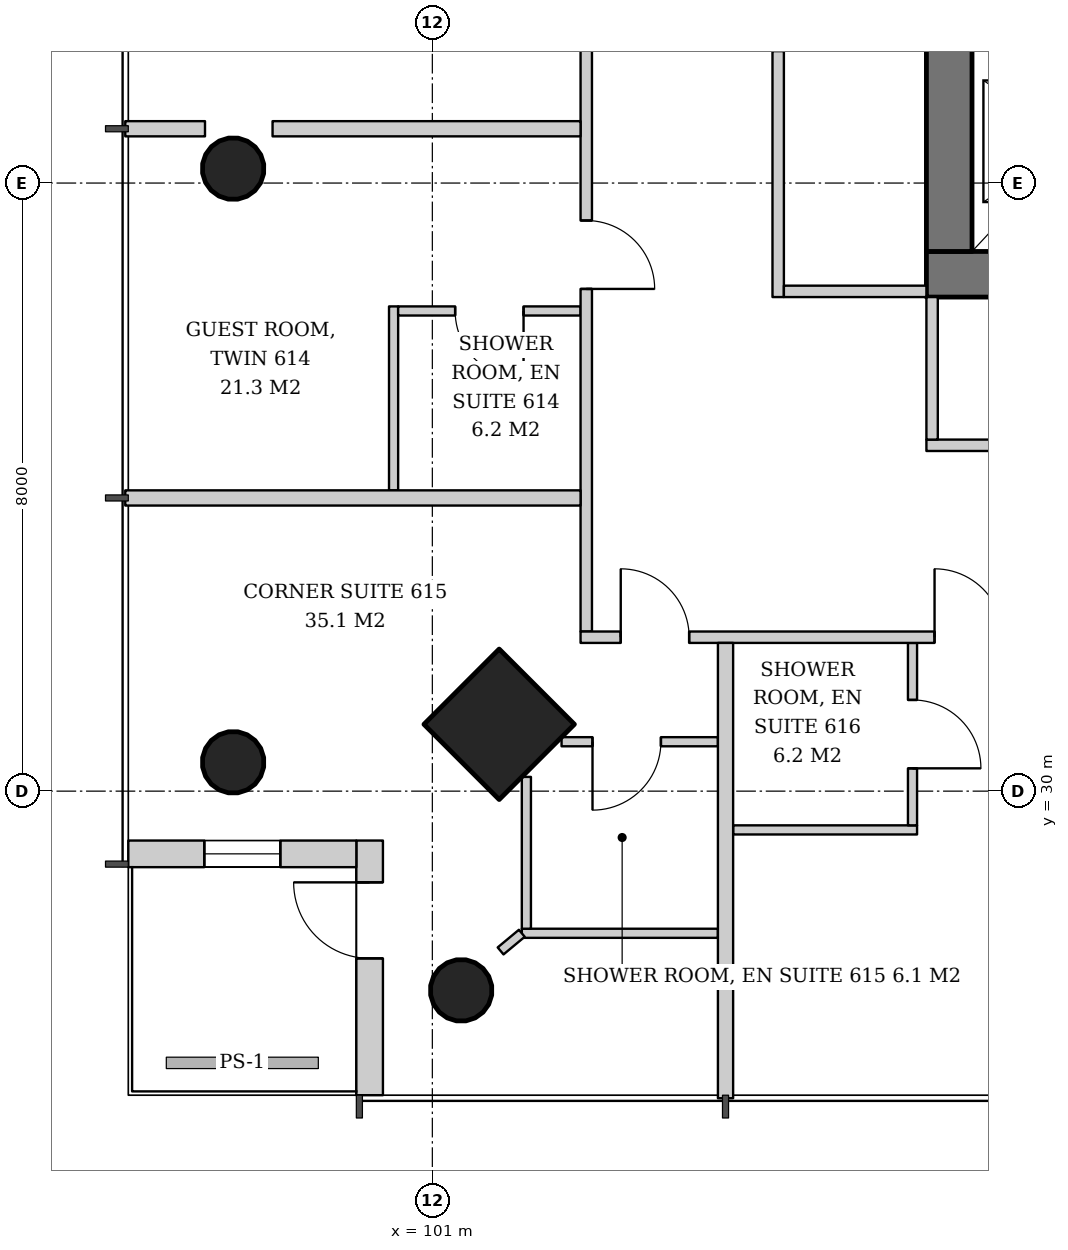
"""IFC4 building model, lengths in metres.
Left out: names, types, materials, properties, quantities, classifications, styles, units other than length and angle.
Written with IfcOpenShell. Run it as: python <this file> out.ifc"""

import sys

from ifc_helpers import new_model, si_unit, direction, frame, frame_2d, origin, origin_2d, place, context, subcontext, project, spatial, rectangle, hollow_circle, extrude, element, fill, save


model = new_model("IFC4")
c1 = context("Model", 3, precision=1e-05, world=origin(), true_north=direction((0.0, 1.0)))
c2 = subcontext(c1, "Body", "Model", "MODEL_VIEW")
j1 = project(units=[si_unit("LENGTHUNIT", "METRE"), si_unit("PLANEANGLEUNIT", "RADIAN")], contexts=[c1])
p1 = place(None, origin())
s1 = spatial("IfcSite", under=j1, at=p1, CompositionType="ELEMENT")
p2 = place(p1, origin())
s2 = spatial("IfcBuilding", under=s1, at=p2, CompositionType="ELEMENT")
p3 = place(p2, frame((0.0, 0.0, 28.6)))
s3 = spatial("IfcBuildingStorey", under=s2, at=p3, CompositionType="ELEMENT", Elevation=28.6)
p4 = place(p3, frame((101.828, 30.828, 0.0), z_axis=(0.043032401563, 0.043032401563, 0.998146494675), x_axis=(-0.707106781187, 0.707106781187, 0.0)))
e1 = element("IfcColumn", 1, at=p4, inside=s3, PredefinedType="COLUMN", context=c2, shape_type="SweptSolid", body=[
    extrude(rectangle(XDim=1.4, YDim=1.4, at=origin_2d()), origin(), (0.0, 0.0, 1.0), 3.807),
])
p5 = place(p3, frame((98.328, 30.328, 0.0), z_axis=(0.043032401563, 0.043032401563, 0.998146494675), x_axis=(-0.707106781187, 0.707106781187, 0.0)))
e2 = element("IfcColumn", 2, at=p5, inside=s3, PredefinedType="COLUMN", context=c2, shape_type="SweptSolid", body=[
    extrude(hollow_circle(Radius=0.406, WallThickness=0.03, at=origin_2d()), origin(), (0.0, 0.0, 1.0), 3.807),
])
p6 = place(p3, frame((98.328, 38.164, 0.0), z_axis=(0.04306234503, 0.02149908433, 0.998841040313), x_axis=(-0.446680166538, 0.894693706707, 0.0)))
e3 = element("IfcColumn", 3, at=p6, inside=s3, PredefinedType="COLUMN", context=c2, shape_type="SweptSolid", body=[
    extrude(hollow_circle(Radius=0.406, WallThickness=0.03, at=origin_2d()), origin(), (0.0, 0.0, 1.0), 3.804),
])
p7 = place(p3, frame((101.328, 27.328, 0.0), z_axis=(0.043032401563, 0.043032401563, 0.998146494675), x_axis=(-0.707106781187, 0.707106781187, 0.0)))
e4 = element("IfcColumn", 4, at=p7, inside=s3, PredefinedType="COLUMN", context=c2, shape_type="SweptSolid", body=[
    extrude(hollow_circle(Radius=0.406, WallThickness=0.03, at=origin_2d()), origin(), (0.0, 0.0, 1.0), 3.807),
])
p8 = place(p3, frame((107.5, 36.8, 0.0), z_axis=(0.0, 0.0, 1.0), x_axis=(1.0, 0.0, 0.0)))
e5 = element("IfcWall", 5, at=p8, inside=s3, PredefinedType="SHEAR", context=c2, shape_type="SweptSolid", body=[
    extrude(rectangle(XDim=19.0, YDim=0.6, at=frame_2d((9.5, 0.0))), origin(), (0.0, 0.0, 1.0), 3.8),
])
p9 = place(p8, frame((3.9, 0.0, 0.0)))
e6 = element("IfcOpeningElement", 6, at=p9, cuts=e5, PredefinedType="OPENING", context=c2, shape_type="SweptSolid", body=[
    extrude(rectangle(XDim=1.0, YDim=2.1, at=frame_2d((0.5, 1.05))), frame((0.0, 0.31, 0.0), z_axis=(0.0, -1.0, 0.0), x_axis=(1.0, 0.0, 0.0)), (0.0, 0.0, 1.0), 0.62),
])
p10 = place(p8, frame((14.472, 0.0, 0.0)))
e7 = element("IfcOpeningElement", 7, at=p10, cuts=e5, PredefinedType="OPENING", context=c2, shape_type="SweptSolid", body=[
    extrude(rectangle(XDim=1.0, YDim=2.1, at=frame_2d((0.5, 1.05))), frame((0.0, 0.31, 0.0), z_axis=(0.0, -1.0, 0.0), x_axis=(1.0, 0.0, 0.0)), (0.0, 0.0, 1.0), 0.62),
])
p11 = place(p8, frame((16.365, 0.0, 0.0)))
e8 = element("IfcOpeningElement", 8, at=p11, cuts=e5, PredefinedType="OPENING", context=c2, shape_type="SweptSolid", body=[
    extrude(rectangle(XDim=1.0, YDim=2.1, at=frame_2d((0.5, 1.05))), frame((0.0, 0.31, 0.0), z_axis=(0.0, -1.0, 0.0), x_axis=(1.0, 0.0, 0.0)), (0.0, 0.0, 1.0), 0.62),
])
p12 = place(p3, frame((107.8, 37.1, 0.0), z_axis=(0.0, 0.0, 1.0), x_axis=(0.0, 1.0, 0.0)))
e9 = element("IfcWall", 9, at=p12, inside=s3, PredefinedType="SHEAR", context=c2, shape_type="SweptSolid", body=[
    extrude(rectangle(XDim=17.8, YDim=0.6, at=frame_2d((8.9, 0.0))), origin(), (0.0, 0.0, 1.0), 3.8),
])
p13 = place(p12, frame((8.0, 0.0, 0.0)))
e10 = element("IfcOpeningElement", 10, at=p13, cuts=e9, PredefinedType="OPENING", context=c2, shape_type="SweptSolid", body=[
    extrude(rectangle(XDim=1.8, YDim=2.4, at=frame_2d((0.9, 1.2))), frame((0.0, 0.31, 0.0), z_axis=(0.0, -1.0, 0.0), x_axis=(1.0, 0.0, 0.0)), (0.0, 0.0, 1.0), 0.62),
])
p14 = place(p3, frame((100.175, 26.0, 0.0), z_axis=(0.0, 0.0, 1.0), x_axis=(0.0, 1.0, 0.0)))
e11 = element("IfcWall", 11, at=p14, inside=s3, PredefinedType="SOLIDWALL", context=c2, shape_type="SweptSolid", body=[
    extrude(rectangle(XDim=3.35, YDim=0.35, at=frame_2d((1.675, 0.0))), origin(), (0.0, 0.0, 1.0), 3.6),
])
p15 = place(p14, frame((1.8, 0.0, 0.0)))
e12 = element("IfcOpeningElement", 12, at=p15, cuts=e11, PredefinedType="OPENING", context=c2, shape_type="SweptSolid", body=[
    extrude(rectangle(XDim=1.0, YDim=2.4, at=frame_2d((0.5, 1.2))), frame((0.0, 0.185, 0.0), z_axis=(0.0, -1.0, 0.0), x_axis=(1.0, 0.0, 0.0)), (0.0, 0.0, 1.0), 0.37),
])
p16 = place(p3, frame((100.0, 29.175, 0.0), z_axis=(0.0, 0.0, 1.0), x_axis=(-1.0, 0.0, 0.0)))
e13 = element("IfcWall", 13, at=p16, inside=s3, PredefinedType="SOLIDWALL", context=c2, shape_type="SweptSolid", body=[
    extrude(rectangle(XDim=3.0, YDim=0.35, at=frame_2d((1.5, 0.0))), origin(), (0.0, 0.0, 1.0), 3.6),
])
p17 = place(p16, frame((1.0, 0.0, 0.9)))
e14 = element("IfcOpeningElement", 14, at=p17, cuts=e13, PredefinedType="OPENING", context=c2, shape_type="SweptSolid", body=[
    extrude(rectangle(XDim=1.0, YDim=2.4, at=frame_2d((0.5, 1.2))), frame((0.0, 0.185, 0.0), z_axis=(0.0, -1.0, 0.0), x_axis=(1.0, 0.0, 0.0)), (0.0, 0.0, 1.0), 0.37),
])
p18 = place(p3, frame((105.55, 43.975, 0.0), z_axis=(0.0, 0.0, 1.0), x_axis=(0.0, -1.0, 0.0)))
e15 = element("IfcWall", 15, at=p18, inside=s3, PredefinedType="PARTITIONING", context=c2, shape_type="SweptSolid", body=[
    extrude(rectangle(XDim=7.475, YDim=0.15, at=frame_2d((3.738, 0.0))), origin(), (0.0, 0.0, 1.0), 2.847),
])
p19 = place(p18, frame((3.238, 0.0, 0.0)))
e16 = element("IfcOpeningElement", 16, at=p19, cuts=e15, PredefinedType="OPENING", context=c2, shape_type="SweptSolid", body=[
    extrude(rectangle(XDim=1.0, YDim=2.1, at=frame_2d((0.5, 1.05))), frame((0.0, 0.085, 0.0), z_axis=(0.0, -1.0, 0.0), x_axis=(1.0, 0.0, 0.0)), (0.0, 0.0, 1.0), 0.17),
])
p20 = place(p3, frame((107.5, 36.575, 0.0), z_axis=(0.0, 0.0, 1.0), x_axis=(-1.0, 0.0, 0.0)))
e17 = element("IfcWall", 17, at=p20, inside=s3, PredefinedType="PARTITIONING", context=c2, shape_type="SweptSolid", body=[
    extrude(rectangle(XDim=1.875, YDim=0.15, at=frame_2d((0.938, 0.0))), origin(), (0.0, 0.0, 1.0), 3.6),
])
p21 = place(p3, frame((107.5, 34.55, 0.0), z_axis=(0.0, 0.0, 1.0), x_axis=(1.0, 0.0, 0.0)))
e18 = element("IfcWall", 18, at=p21, inside=s3, PredefinedType="PARTITIONING", context=c2, shape_type="SweptSolid", body=[
    extrude(rectangle(XDim=2.775, YDim=0.15, at=frame_2d((1.387, 0.0))), origin(), (0.0, 0.0, 1.0), 2.8),
])
p22 = place(p21, frame((0.887, 0.0, 0.0)))
e19 = element("IfcOpeningElement", 19, at=p22, cuts=e18, PredefinedType="OPENING", context=c2, shape_type="SweptSolid", body=[
    extrude(rectangle(XDim=1.0, YDim=2.1, at=frame_2d((0.5, 1.05))), frame((0.0, 0.085, 0.0), z_axis=(0.0, -1.0, 0.0), x_axis=(1.0, 0.0, 0.0)), (0.0, 0.0, 1.0), 0.17),
])
p23 = place(p3, frame((107.575, 36.5, 0.0), z_axis=(0.0, 0.0, 1.0), x_axis=(0.0, -1.0, 0.0)))
e20 = element("IfcWall", 20, at=p23, inside=s3, PredefinedType="PARTITIONING", context=c2, shape_type="SweptSolid", body=[
    extrude(rectangle(XDim=1.875, YDim=0.15, at=frame_2d((0.938, 0.0))), origin(), (0.0, 0.0, 1.0), 2.8),
])
p24 = place(p3, frame((100.49, 36.377, 0.0), z_axis=(0.0, 0.0, 1.0), x_axis=(0.0, -1.0, 0.0)))
e21 = element("IfcWall", 21, at=p24, inside=s3, PredefinedType="PARTITIONING", context=c2, shape_type="SweptSolid", body=[
    extrude(rectangle(XDim=2.42, YDim=0.12, at=frame_2d((1.21, 0.0))), origin(), (0.0, 0.0, 1.0), 2.847),
])
p25 = place(p3, frame((102.95, 36.317, 0.0), z_axis=(0.0, 0.0, 1.0), x_axis=(-1.0, 0.0, 0.0)))
e22 = element("IfcWall", 22, at=p25, inside=s3, PredefinedType="PARTITIONING", context=c2, shape_type="SweptSolid", body=[
    extrude(rectangle(XDim=2.4, YDim=0.12, at=frame_2d((1.2, 0.0))), origin(), (0.0, 0.0, 1.0), 3.6),
])
p26 = place(p25, frame((0.75, 0.0, 0.0)))
e23 = element("IfcOpeningElement", 23, at=p26, cuts=e22, PredefinedType="OPENING", context=c2, shape_type="SweptSolid", body=[
    extrude(rectangle(XDim=0.9, YDim=2.1, at=frame_2d((0.45, 1.05))), frame((0.0, 0.07, 0.0), z_axis=(0.0, -1.0, 0.0), x_axis=(1.0, 0.0, 0.0)), (0.0, 0.0, 1.0), 0.14),
])
p27 = place(p3, frame((103.025, 60.05, 0.0), z_axis=(0.0, 0.0, 1.0), x_axis=(0.0, -1.0, 0.0)))
e24 = element("IfcWall", 24, at=p27, inside=s3, PredefinedType="PARTITIONING", context=c2, shape_type="SweptSolid", body=[
    extrude(rectangle(XDim=27.95, YDim=0.15, at=frame_2d((13.975, 0.0))), origin(), (0.0, 0.0, 1.0), 2.8),
])
p28 = place(p27, frame((0.529, 0.0, 0.0)))
e25 = element("IfcOpeningElement", 25, at=p28, cuts=e24, PredefinedType="OPENING", context=c2, shape_type="SweptSolid", body=[
    extrude(rectangle(XDim=0.9, YDim=2.1, at=frame_2d((0.45, 1.05))), frame((0.0, 0.085, 0.0), z_axis=(0.0, -1.0, 0.0), x_axis=(1.0, 0.0, 0.0)), (0.0, 0.0, 1.0), 0.17),
])
p29 = place(p27, frame((4.657, 0.0, 0.0)))
e26 = element("IfcOpeningElement", 26, at=p29, cuts=e24, PredefinedType="OPENING", context=c2, shape_type="SweptSolid", body=[
    extrude(rectangle(XDim=0.9, YDim=2.1, at=frame_2d((0.45, 1.05))), frame((0.0, 0.085, 0.0), z_axis=(0.0, -1.0, 0.0), x_axis=(1.0, 0.0, 0.0)), (0.0, 0.0, 1.0), 0.17),
])
p30 = place(p27, frame((14.322, 0.0, 0.0)))
e27 = element("IfcOpeningElement", 27, at=p30, cuts=e24, PredefinedType="OPENING", context=c2, shape_type="SweptSolid", body=[
    extrude(rectangle(XDim=1.0, YDim=2.1, at=frame_2d((0.5, 1.05))), frame((0.0, 0.085, 0.0), z_axis=(0.0, -1.0, 0.0), x_axis=(1.0, 0.0, 0.0)), (0.0, 0.0, 1.0), 0.17),
])
p31 = place(p27, frame((19.229, 0.0, 0.0)))
e28 = element("IfcOpeningElement", 28, at=p31, cuts=e24, PredefinedType="OPENING", context=c2, shape_type="SweptSolid", body=[
    extrude(rectangle(XDim=0.9, YDim=2.1, at=frame_2d((0.45, 1.05))), frame((0.0, 0.085, 0.0), z_axis=(0.0, -1.0, 0.0), x_axis=(1.0, 0.0, 0.0)), (0.0, 0.0, 1.0), 0.17),
])
p32 = place(p27, frame((22.543, 0.0, 0.0)))
e29 = element("IfcOpeningElement", 29, at=p32, cuts=e24, PredefinedType="OPENING", context=c2, shape_type="SweptSolid", body=[
    extrude(rectangle(XDim=0.9, YDim=2.1, at=frame_2d((0.45, 1.05))), frame((0.0, 0.085, 0.0), z_axis=(0.0, -1.0, 0.0), x_axis=(1.0, 0.0, 0.0)), (0.0, 0.0, 1.0), 0.17),
])
p33 = place(p3, frame((102.95, 38.714, 0.0), z_axis=(0.0, 0.0, 1.0), x_axis=(-1.0, 0.0, 0.0)))
e30 = element("IfcWall", 30, at=p33, inside=s3, PredefinedType="PARTITIONING", context=c2, shape_type="SweptSolid", body=[
    extrude(rectangle(XDim=4.052, YDim=0.2, at=frame_2d((2.026, 0.0))), origin(), (0.0, 0.0, 1.0), 3.6),
])
p34 = place(p3, frame((98.009, 38.714, 0.0), z_axis=(0.0, 0.0, 1.0), x_axis=(-1.0, 0.0, 0.0)))
e31 = element("IfcWall", 31, at=p34, inside=s3, PredefinedType="PARTITIONING", context=c2, shape_type="SweptSolid", body=[
    extrude(rectangle(XDim=1.049, YDim=0.2, at=frame_2d((0.524, 0.0))), origin(), (0.0, 0.0, 1.0), 3.6),
])
p35 = place(p3, frame((102.95, 33.857, 0.0), z_axis=(0.0, 0.0, 1.0), x_axis=(-1.0, 0.0, 0.0)))
e32 = element("IfcWall", 32, at=p35, inside=s3, PredefinedType="PARTITIONING", context=c2, shape_type="SweptSolid", body=[
    extrude(rectangle(XDim=5.99, YDim=0.2, at=frame_2d((2.995, 0.0))), origin(), (0.0, 0.0, 1.0), 3.05),
])
p36 = place(p3, frame((104.757, 30.65, 0.0), z_axis=(0.0, 0.0, 1.0), x_axis=(-1.0, 0.0, 0.0)))
e33 = element("IfcWall", 33, at=p36, inside=s3, PredefinedType="PARTITIONING", context=c2, shape_type="SweptSolid", body=[
    extrude(rectangle(XDim=2.057, YDim=0.12, at=frame_2d((1.029, 0.0))), origin(), (0.0, 0.0, 1.0), 3.6),
])
p37 = place(p36, frame((0.75, 0.0, 0.0)))
e34 = element("IfcOpeningElement", 34, at=p37, cuts=e33, PredefinedType="OPENING", context=c2, shape_type="SweptSolid", body=[
    extrude(rectangle(XDim=0.9, YDim=2.1, at=frame_2d((0.45, 1.05))), frame((0.0, 0.07, 0.0), z_axis=(0.0, -1.0, 0.0), x_axis=(1.0, 0.0, 0.0)), (0.0, 0.0, 1.0), 0.14),
])
p38 = place(p3, frame((104.757, 28.13, 0.0), z_axis=(0.0, 0.0, 1.0), x_axis=(-1.0, 0.0, 0.0)))
e35 = element("IfcWall", 35, at=p38, inside=s3, PredefinedType="PARTITIONING", context=c2, shape_type="SweptSolid", body=[
    extrude(rectangle(XDim=2.58, YDim=0.12, at=frame_2d((1.29, 0.0))), origin(), (0.0, 0.0, 1.0), 3.6),
])
p39 = place(p3, frame((102.237, 30.187, 0.0), z_axis=(0.0, 0.0, 1.0), x_axis=(0.0, -1.0, 0.0)))
e36 = element("IfcWall", 36, at=p39, inside=s3, PredefinedType="PARTITIONING", context=c2, shape_type="SweptSolid", body=[
    extrude(rectangle(XDim=1.997, YDim=0.12, at=frame_2d((0.999, 0.0))), origin(), (0.0, 0.0, 1.0), 3.6),
])
p40 = place(p3, frame((104.957, 29.49, 0.0), z_axis=(0.0, 0.0, 1.0), x_axis=(1.0, 0.0, 0.0)))
e37 = element("IfcWall", 37, at=p40, inside=s3, PredefinedType="PARTITIONING", context=c2, shape_type="SweptSolid", body=[
    extrude(rectangle(XDim=2.42, YDim=0.12, at=frame_2d((1.21, 0.0))), origin(), (0.0, 0.0, 1.0), 3.6),
])
p41 = place(p3, frame((107.317, 31.95, 0.0), z_axis=(0.0, 0.0, 1.0), x_axis=(0.0, -1.0, 0.0)))
e38 = element("IfcWall", 38, at=p41, inside=s3, PredefinedType="PARTITIONING", context=c2, shape_type="SweptSolid", body=[
    extrude(rectangle(XDim=2.4, YDim=0.12, at=frame_2d((1.2, 0.0))), origin(), (0.0, 0.0, 1.0), 2.847),
])
p42 = place(p41, frame((0.75, 0.0, 0.0)))
e39 = element("IfcOpeningElement", 39, at=p42, cuts=e38, PredefinedType="OPENING", context=c2, shape_type="SweptSolid", body=[
    extrude(rectangle(XDim=0.9, YDim=2.1, at=frame_2d((0.45, 1.05))), frame((0.0, 0.07, 0.0), z_axis=(0.0, -1.0, 0.0), x_axis=(1.0, 0.0, 0.0)), (0.0, 0.0, 1.0), 0.14),
])
p43 = place(p3, frame((102.95, 32.025, 0.0), z_axis=(0.0, 0.0, 1.0), x_axis=(1.0, 0.0, 0.0)))
e40 = element("IfcWall", 40, at=p43, inside=s3, PredefinedType="PARTITIONING", context=c2, shape_type="SweptSolid", body=[
    extrude(rectangle(XDim=27.95, YDim=0.15, at=frame_2d((13.975, 0.0))), origin(), (0.0, 0.0, 1.0), 2.8),
])
p44 = place(p43, frame((0.529, 0.0, 0.0)))
e41 = element("IfcOpeningElement", 41, at=p44, cuts=e40, PredefinedType="OPENING", context=c2, shape_type="SweptSolid", body=[
    extrude(rectangle(XDim=0.9, YDim=2.1, at=frame_2d((0.45, 1.05))), frame((0.0, 0.085, 0.0), z_axis=(0.0, -1.0, 0.0), x_axis=(1.0, 0.0, 0.0)), (0.0, 0.0, 1.0), 0.17),
])
p45 = place(p43, frame((4.657, 0.0, 0.0)))
e42 = element("IfcOpeningElement", 42, at=p45, cuts=e40, PredefinedType="OPENING", context=c2, shape_type="SweptSolid", body=[
    extrude(rectangle(XDim=0.9, YDim=2.1, at=frame_2d((0.45, 1.05))), frame((0.0, 0.085, 0.0), z_axis=(0.0, -1.0, 0.0), x_axis=(1.0, 0.0, 0.0)), (0.0, 0.0, 1.0), 0.17),
])
p46 = place(p43, frame((14.371, 0.0, 0.0)))
e43 = element("IfcOpeningElement", 43, at=p46, cuts=e40, PredefinedType="OPENING", context=c2, shape_type="SweptSolid", body=[
    extrude(rectangle(XDim=0.9, YDim=2.1, at=frame_2d((0.45, 1.05))), frame((0.0, 0.085, 0.0), z_axis=(0.0, -1.0, 0.0), x_axis=(1.0, 0.0, 0.0)), (0.0, 0.0, 1.0), 0.17),
])
p47 = place(p43, frame((17.686, 0.0, 0.0)))
e44 = element("IfcOpeningElement", 44, at=p47, cuts=e40, PredefinedType="OPENING", context=c2, shape_type="SweptSolid", body=[
    extrude(rectangle(XDim=0.9, YDim=2.1, at=frame_2d((0.45, 1.05))), frame((0.0, 0.085, 0.0), z_axis=(0.0, -1.0, 0.0), x_axis=(1.0, 0.0, 0.0)), (0.0, 0.0, 1.0), 0.17),
])
p48 = place(p43, frame((24.086, 0.0, 0.0)))
e45 = element("IfcOpeningElement", 45, at=p48, cuts=e40, PredefinedType="OPENING", context=c2, shape_type="SweptSolid", body=[
    extrude(rectangle(XDim=0.9, YDim=2.1, at=frame_2d((0.45, 1.05))), frame((0.0, 0.085, 0.0), z_axis=(0.0, -1.0, 0.0), x_axis=(1.0, 0.0, 0.0)), (0.0, 0.0, 1.0), 0.17),
])
p49 = place(p3, frame((104.857, 31.95, 0.0), z_axis=(0.0, 0.0, 1.0), x_axis=(0.0, -1.0, 0.0)))
e46 = element("IfcWall", 46, at=p49, inside=s3, PredefinedType="PARTITIONING", context=c2, shape_type="SweptSolid", body=[
    extrude(rectangle(XDim=5.99, YDim=0.2, at=frame_2d((2.995, 0.0))), origin(), (0.0, 0.0, 1.0), 2.847),
])
p50 = place(p3, frame((102.177, 28.13, 0.0), z_axis=(0.0, 0.0, 1.0), x_axis=(-0.76932257457, -0.638860529582, 0.0)))
e47 = element("IfcWall", 47, at=p50, inside=s3, PredefinedType="PARTITIONING", context=c2, shape_type="SweptSolid", body=[
    extrude(rectangle(XDim=0.363, YDim=0.12, at=frame_2d((0.182, 0.0))), origin(), (0.0, 0.0, 1.0), 3.6),
])
p51 = place(p15, origin())
e48 = element("IfcDoor", 48, at=p51, inside=s3, OperationType="SINGLE_SWING_RIGHT", PredefinedType="DOOR", context=c2, shape_type="SweptSolid", body=[
    extrude(rectangle(XDim=1.0, YDim=2.4, at=frame_2d((0.5, 1.2))), frame((0.0, 0.025, 0.0), z_axis=(0.0, -1.0, 0.0), x_axis=(1.0, 0.0, 0.0)), (0.0, 0.0, 1.0), 0.05),
])
fill(e12, e48)
p52 = place(p17, origin())
e49 = element("IfcWindow", 49, at=p52, inside=s3, PartitioningType="SINGLE_PANEL", PredefinedType="WINDOW", context=c2, shape_type="SweptSolid", body=[
    extrude(rectangle(XDim=1.0, YDim=2.4, at=frame_2d((0.5, 1.2))), frame((0.0, 0.03, 0.0), z_axis=(0.0, -1.0, 0.0), x_axis=(1.0, 0.0, 0.0)), (0.0, 0.0, 1.0), 0.06),
])
fill(e14, e49)
p53 = place(p26, origin())
e50 = element("IfcDoor", 50, at=p53, inside=s3, OperationType="SINGLE_SWING_LEFT", PredefinedType="DOOR", context=c2, shape_type="SweptSolid", body=[
    extrude(rectangle(XDim=0.9, YDim=2.1, at=frame_2d((0.45, 1.05))), frame((0.0, 0.025, 0.0), z_axis=(0.0, -1.0, 0.0), x_axis=(1.0, 0.0, 0.0)), (0.0, 0.0, 1.0), 0.05),
])
fill(e23, e50)
p54 = place(p32, origin())
e51 = element("IfcDoor", 51, at=p54, inside=s3, OperationType="SINGLE_SWING_RIGHT", PredefinedType="DOOR", context=c2, shape_type="SweptSolid", body=[
    extrude(rectangle(XDim=0.9, YDim=2.1, at=frame_2d((0.45, 1.05))), frame((0.0, 0.025, 0.0), z_axis=(0.0, -1.0, 0.0), x_axis=(1.0, 0.0, 0.0)), (0.0, 0.0, 1.0), 0.05),
])
fill(e29, e51)
p55 = place(p37, origin())
e52 = element("IfcDoor", 52, at=p55, inside=s3, OperationType="SINGLE_SWING_RIGHT", PredefinedType="DOOR", context=c2, shape_type="SweptSolid", body=[
    extrude(rectangle(XDim=0.9, YDim=2.1, at=frame_2d((0.45, 1.05))), frame((0.0, 0.025, 0.0), z_axis=(0.0, -1.0, 0.0), x_axis=(1.0, 0.0, 0.0)), (0.0, 0.0, 1.0), 0.05),
])
fill(e34, e52)
p56 = place(p42, origin())
e53 = element("IfcDoor", 53, at=p56, inside=s3, OperationType="SINGLE_SWING_RIGHT", PredefinedType="DOOR", context=c2, shape_type="SweptSolid", body=[
    extrude(rectangle(XDim=0.9, YDim=2.1, at=frame_2d((0.45, 1.05))), frame((0.0, 0.025, 0.0), z_axis=(0.0, -1.0, 0.0), x_axis=(1.0, 0.0, 0.0)), (0.0, 0.0, 1.0), 0.05),
])
fill(e39, e53)
p57 = place(p44, origin())
e54 = element("IfcDoor", 54, at=p57, inside=s3, OperationType="SINGLE_SWING_LEFT", PredefinedType="DOOR", context=c2, shape_type="SweptSolid", body=[
    extrude(rectangle(XDim=0.9, YDim=2.1, at=frame_2d((0.45, 1.05))), frame((0.0, 0.025, 0.0), z_axis=(0.0, -1.0, 0.0), x_axis=(1.0, 0.0, 0.0)), (0.0, 0.0, 1.0), 0.05),
])
fill(e41, e54)
p58 = place(p45, origin())
e55 = element("IfcDoor", 55, at=p58, inside=s3, OperationType="SINGLE_SWING_LEFT", PredefinedType="DOOR", context=c2, shape_type="SweptSolid", body=[
    extrude(rectangle(XDim=0.9, YDim=2.1, at=frame_2d((0.45, 1.05))), frame((0.0, 0.025, 0.0), z_axis=(0.0, -1.0, 0.0), x_axis=(1.0, 0.0, 0.0)), (0.0, 0.0, 1.0), 0.05),
])
fill(e42, e55)
save(model, sys.argv[1])
